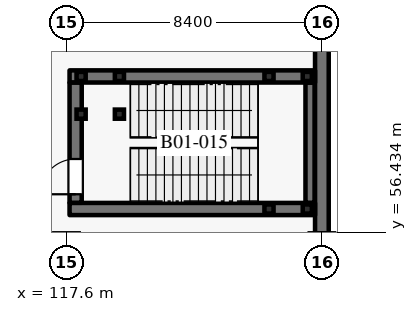
"""IFC4 building model, lengths in metres.
Left out: names, types, materials, properties, quantities, classifications, styles, units other than length and angle.
Written with IfcOpenShell. Run it as: python <this file> out.ifc"""

import sys

from ifc_helpers import new_model, si_unit, direction, frame, frame_2d, origin, origin_2d, place, context, subcontext, project, spatial, rectangle, hollow_rectangle, extrude, element, fill, save


model = new_model("IFC4")
c1 = context("Model", 3, precision=1e-05, world=origin(), true_north=direction((0.0, 1.0)))
c2 = subcontext(c1, "Body", "Model", "MODEL_VIEW")
j1 = project(units=[si_unit("LENGTHUNIT", "METRE"), si_unit("PLANEANGLEUNIT", "RADIAN")], contexts=[c1])
p1 = place(None, origin())
s1 = spatial("IfcSite", under=j1, at=p1, CompositionType="ELEMENT")
p2 = place(p1, origin())
s2 = spatial("IfcBuilding", under=s1, at=p2, CompositionType="ELEMENT")
p3 = place(p2, frame((0.0, 0.0, -5.4)))
s3 = spatial("IfcBuildingStorey", under=s2, at=p3, CompositionType="ELEMENT", Elevation=-5.4)
p4 = place(p3, frame((126.0, 63.6, 0.0), z_axis=(0.0, 0.0, 1.0), x_axis=(0.0, -1.0, 0.0)))
e1 = element("IfcWall", 1, at=p4, inside=s3, PredefinedType="USERDEFINED", context=c2, shape_type="SweptSolid", body=[
    extrude(rectangle(XDim=7.2, YDim=0.45, at=frame_2d((3.6, 0.0))), origin(), (0.0, 0.0, 1.0), 4.3),
])
p5 = place(p3, frame((117.7, 57.2, 0.0), z_axis=(0.0, 0.0, 1.0), x_axis=(1.0, 0.0, 0.0)))
e2 = element("IfcWall", 2, at=p5, inside=s3, PredefinedType="SHEAR", context=c2, shape_type="SweptSolid", body=[
    extrude(rectangle(XDim=8.075, YDim=0.4, at=frame_2d((4.038, 0.0))), origin(), (0.0, 0.0, 1.0), 4.995),
])
p6 = place(p3, frame((125.61, 57.405, 0.0), z_axis=(0.0, 0.0, 1.0), x_axis=(0.0, 1.0, 0.0)))
e3 = element("IfcWall", 3, at=p6, inside=s3, PredefinedType="SHEAR", context=c2, shape_type="SweptSolid", body=[
    extrude(rectangle(XDim=3.95, YDim=0.3, at=frame_2d((1.975, 0.0))), origin(), (0.0, 0.0, 1.0), 4.995),
])
p7 = place(p3, frame((117.7, 61.56, 0.0), z_axis=(0.0, 0.0, 1.0), x_axis=(1.0, 0.0, 0.0)))
e4 = element("IfcWall", 4, at=p7, inside=s3, PredefinedType="SHEAR", context=c2, shape_type="SweptSolid", body=[
    extrude(rectangle(XDim=8.075, YDim=0.4, at=frame_2d((4.038, 0.0))), origin(), (0.0, 0.0, 1.0), 4.995),
])
p8 = place(p3, frame((117.9, 57.405, 0.0), z_axis=(0.0, 0.0, 1.0), x_axis=(0.0, 1.0, 0.0)))
e5 = element("IfcWall", 5, at=p8, inside=s3, PredefinedType="SHEAR", context=c2, shape_type="SweptSolid", body=[
    extrude(rectangle(XDim=3.95, YDim=0.4, at=frame_2d((1.975, 0.0))), origin(), (0.0, 0.0, 1.0), 4.995),
])
p9 = place(p8, frame((0.28, 0.0, 0.0)))
e6 = element("IfcOpeningElement", 6, at=p9, cuts=e5, PredefinedType="OPENING", context=c2, shape_type="SweptSolid", body=[
    extrude(rectangle(XDim=1.16, YDim=2.2, at=frame_2d((0.58, 1.1))), frame((0.0, 0.21, 0.0), z_axis=(0.0, -1.0, 0.0), x_axis=(1.0, 0.0, 0.0)), (0.0, 0.0, 1.0), 0.42),
])
for number, where, z_axis, x_axis in (
    (7, (118.08, 60.32, 0.0), (0.0, 0.0, 1.0), (1.0, 0.0, 0.0)),
    (8, (118.08, 61.56, 0.0), (0.0, 0.0, 1.0), (1.0, 0.0, 0.0)),
    (9, (119.34, 60.32, 0.0), (0.0, 0.0, 1.0), (1.0, 0.0, 0.0)),
    (10, (119.34, 61.56, 0.0), (0.0, 0.0, 1.0), (1.0, 0.0, 0.0)),
):
    element("IfcColumn", number, at=place(p3, frame(where, z_axis=z_axis, x_axis=x_axis)), inside=s3, PredefinedType="COLUMN", context=c2, shape_type="SweptSolid", body=[
        extrude(hollow_rectangle(XDim=0.3, YDim=0.3, WallThickness=0.012, at=origin_2d()), origin(), (0.0, 0.0, 1.0), 5.22),
    ])
for number, where, z_axis, x_axis in (
    (11, (124.26, 57.2, 0.0), (0.0, 0.0, 1.0), (1.0, 0.0, 0.0)),
    (12, (124.26, 61.56, 0.0), (0.0, 0.0, 1.0), (1.0, 0.0, 0.0)),
    (13, (125.52, 57.2, 0.0), (0.0, 0.0, 1.0), (1.0, 0.0, 0.0)),
    (14, (125.52, 61.56, 0.0), (0.0, 0.0, 1.0), (1.0, 0.0, 0.0)),
):
    element("IfcColumn", number, at=place(p3, frame(where, z_axis=z_axis, x_axis=x_axis)), inside=s3, PredefinedType="COLUMN", context=c2, shape_type="SweptSolid", body=[
        extrude(hollow_rectangle(XDim=0.3, YDim=0.3, WallThickness=0.012, at=origin_2d()), origin(), (0.0, 0.0, 1.0), 2.52),
    ])
p10 = place(p9, origin())
e15 = element("IfcDoor", 15, at=p10, inside=s3, OperationType="SINGLE_SWING_LEFT", PredefinedType="DOOR", context=c2, shape_type="SweptSolid", body=[
    extrude(rectangle(XDim=1.16, YDim=2.2, at=frame_2d((0.58, 1.1))), frame((0.0, 0.025, 0.0), z_axis=(0.0, -1.0, 0.0), x_axis=(1.0, 0.0, 0.0)), (0.0, 0.0, 1.0), 0.05),
])
fill(e6, e15)
save(model, sys.argv[1])
